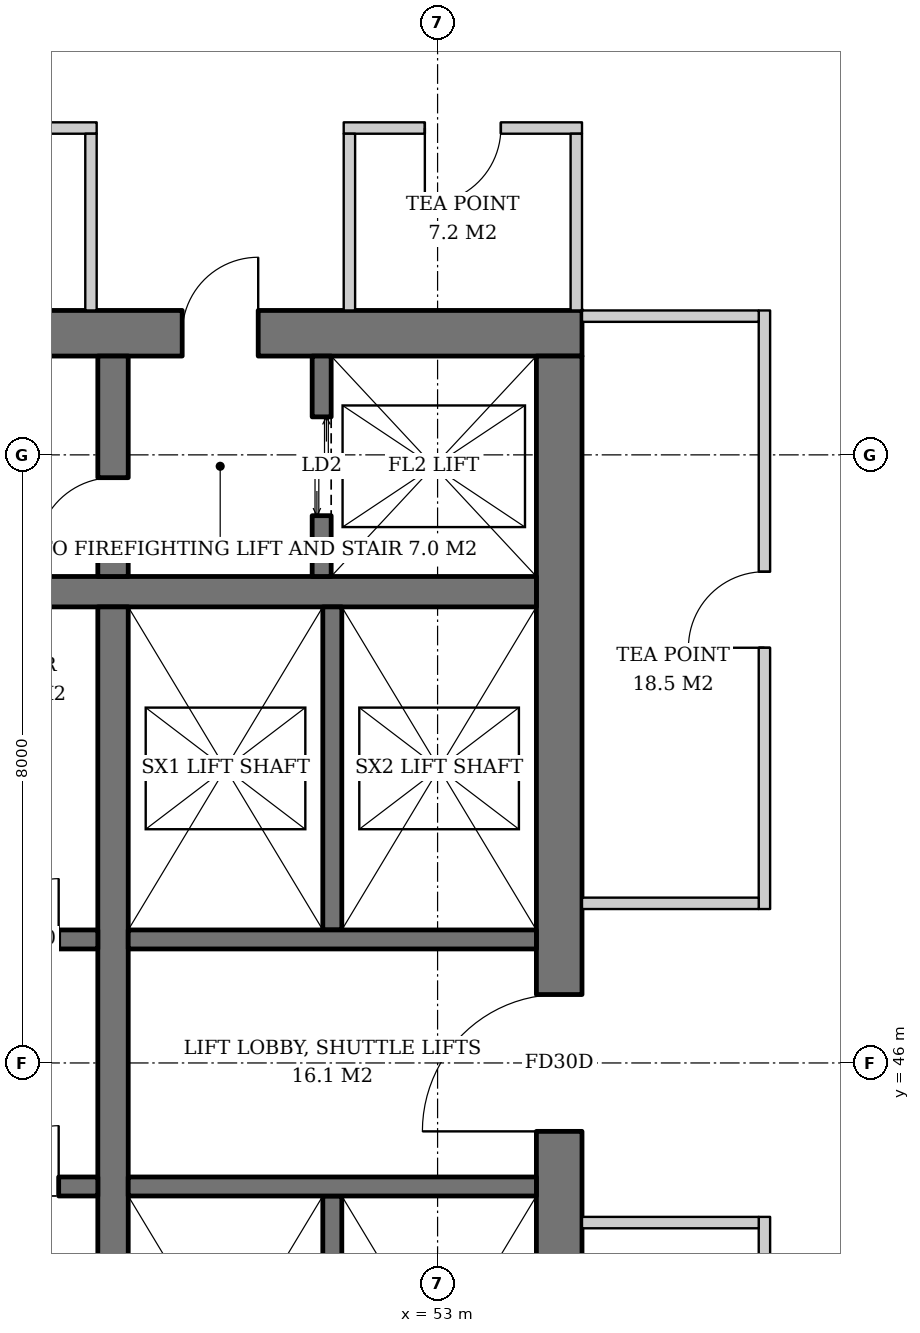
"""IFC4 building model, lengths in metres.
Left out: names, types, materials, properties, quantities, classifications, styles, units other than length and angle.
Written with IfcOpenShell. Run it as: python <this file> out.ifc"""

import sys

from ifc_helpers import new_model, si_unit, direction, frame, frame_2d, origin, origin_2d, place, context, subcontext, project, spatial, rectangle, extrude, element, fill, save


model = new_model("IFC4")
c1 = context("Model", 3, precision=1e-05, world=origin(), true_north=direction((0.0, 1.0)))
c2 = subcontext(c1, "Body", "Model", "MODEL_VIEW")
j1 = project(units=[si_unit("LENGTHUNIT", "METRE"), si_unit("PLANEANGLEUNIT", "RADIAN")], contexts=[c1])
p1 = place(None, origin())
s1 = spatial("IfcSite", under=j1, at=p1, CompositionType="ELEMENT")
p2 = place(p1, origin())
s2 = spatial("IfcBuilding", under=s1, at=p2, CompositionType="ELEMENT")
p3 = place(p2, frame((0.0, 0.0, 188.2)))
s3 = spatial("IfcBuildingStorey", under=s2, at=p3, CompositionType="ELEMENT", Elevation=188.2)
p4 = place(p3, frame((59.557, 60.557, 0.0), z_axis=(-0.031898107953, -0.031898107953, 0.998981992539), x_axis=(0.707106781187, -0.707106781187, 0.0)))
e1 = element("IfcColumn", 1, at=p4, inside=s3, PredefinedType="COLUMN", context=c2, shape_type="SweptSolid", body=[
    extrude(rectangle(XDim=2.0, YDim=2.0, at=origin_2d()), origin(), (0.0, 0.0, 1.0), 3.804),
])
p5 = place(p3, frame((35.1, 55.6, 0.0), z_axis=(0.0, 0.0, 1.0), x_axis=(1.0, 0.0, 0.0)))
e2 = element("IfcWall", 2, at=p5, inside=s3, PredefinedType="SHEAR", context=c2, shape_type="SweptSolid", body=[
    extrude(rectangle(XDim=19.8, YDim=0.6, at=frame_2d((9.9, 0.0))), origin(), (0.0, 0.0, 1.0), 3.8),
])
p6 = place(p5, frame((14.54, 0.0, 0.0)))
e3 = element("IfcOpeningElement", 3, at=p6, cuts=e2, PredefinedType="OPENING", context=c2, shape_type="SweptSolid", body=[
    extrude(rectangle(XDim=1.0, YDim=2.1, at=frame_2d((0.5, 1.05))), frame((0.0, 0.31, 0.0), z_axis=(0.0, -1.0, 0.0), x_axis=(1.0, 0.0, 0.0)), (0.0, 0.0, 1.0), 0.62),
])
p7 = place(p5, frame((1.024, 0.0, 0.0)))
e4 = element("IfcOpeningElement", 4, at=p7, cuts=e2, PredefinedType="OPENING", context=c2, shape_type="SweptSolid", body=[
    extrude(rectangle(XDim=1.0, YDim=2.1, at=frame_2d((0.5, 1.05))), frame((0.0, 0.31, 0.0), z_axis=(0.0, -1.0, 0.0), x_axis=(1.0, 0.0, 0.0)), (0.0, 0.0, 1.0), 0.62),
])
p8 = place(p5, frame((2.524, 0.0, 0.0)))
e5 = element("IfcOpeningElement", 5, at=p8, cuts=e2, PredefinedType="OPENING", context=c2, shape_type="SweptSolid", body=[
    extrude(rectangle(XDim=1.0, YDim=2.1, at=frame_2d((0.5, 1.05))), frame((0.0, 0.31, 0.0), z_axis=(0.0, -1.0, 0.0), x_axis=(1.0, 0.0, 0.0)), (0.0, 0.0, 1.0), 0.62),
])
p9 = place(p5, frame((4.012, 0.0, 0.0)))
e6 = element("IfcOpeningElement", 6, at=p9, cuts=e2, PredefinedType="OPENING", context=c2, shape_type="SweptSolid", body=[
    extrude(rectangle(XDim=1.0, YDim=2.1, at=frame_2d((0.5, 1.05))), frame((0.0, 0.31, 0.0), z_axis=(0.0, -1.0, 0.0), x_axis=(1.0, 0.0, 0.0)), (0.0, 0.0, 1.0), 0.62),
])
p10 = place(p3, frame((54.6, 36.7, 0.0), z_axis=(0.0, 0.0, 1.0), x_axis=(0.0, 1.0, 0.0)))
e7 = element("IfcWall", 7, at=p10, inside=s3, PredefinedType="SHEAR", context=c2, shape_type="SweptSolid", body=[
    extrude(rectangle(XDim=18.6, YDim=0.6, at=frame_2d((9.3, 0.0))), origin(), (0.0, 0.0, 1.0), 3.8),
])
p11 = place(p10, frame((8.4, 0.0, 0.0)))
e8 = element("IfcOpeningElement", 8, at=p11, cuts=e7, PredefinedType="OPENING", context=c2, shape_type="SweptSolid", body=[
    extrude(rectangle(XDim=1.8, YDim=2.4, at=frame_2d((0.9, 1.2))), frame((0.0, 0.31, 0.0), z_axis=(0.0, -1.0, 0.0), x_axis=(1.0, 0.0, 0.0)), (0.0, 0.0, 1.0), 0.62),
])
p12 = place(p3, frame((35.7, 52.2, 0.0), z_axis=(0.0, 0.0, 1.0), x_axis=(1.0, 0.0, 0.0)))
e9 = element("IfcWall", 9, at=p12, inside=s3, PredefinedType="SHEAR", context=c2, shape_type="SweptSolid", body=[
    extrude(rectangle(XDim=18.6, YDim=0.4, at=frame_2d((9.3, 0.0))), origin(), (0.0, 0.0, 1.0), 3.8),
])
p13 = place(p3, frame((48.73, 40.0, 0.0), z_axis=(0.0, 0.0, 1.0), x_axis=(0.0, 1.0, 0.0)))
e10 = element("IfcWall", 10, at=p13, inside=s3, PredefinedType="SHEAR", context=c2, shape_type="SweptSolid", body=[
    extrude(rectangle(XDim=12.0, YDim=0.4, at=frame_2d((6.0, 0.0))), origin(), (0.0, 0.0, 1.0), 3.8),
])
p14 = place(p3, frame((48.73, 52.4, 0.0), z_axis=(0.0, 0.0, 1.0), x_axis=(0.0, 1.0, 0.0)))
e11 = element("IfcWall", 11, at=p14, inside=s3, PredefinedType="SHEAR", context=c2, shape_type="SweptSolid", body=[
    extrude(rectangle(XDim=2.9, YDim=0.4, at=frame_2d((1.45, 0.0))), origin(), (0.0, 0.0, 1.0), 3.8),
])
p15 = place(p14, frame((0.3, 0.0, 0.0)))
e12 = element("IfcOpeningElement", 12, at=p15, cuts=e11, PredefinedType="OPENING", context=c2, shape_type="SweptSolid", body=[
    extrude(rectangle(XDim=1.0, YDim=2.1, at=frame_2d((0.5, 1.05))), frame((0.0, 0.21, 0.0), z_axis=(0.0, -1.0, 0.0), x_axis=(1.0, 0.0, 0.0)), (0.0, 0.0, 1.0), 0.42),
])
p16 = place(p3, frame((51.475, 52.4, 0.0), z_axis=(0.0, 0.0, 1.0), x_axis=(0.0, 1.0, 0.0)))
e13 = element("IfcWall", 13, at=p16, inside=s3, PredefinedType="SHEAR", context=c2, shape_type="SweptSolid", body=[
    extrude(rectangle(XDim=2.9, YDim=0.25, at=frame_2d((1.45, 0.0))), origin(), (0.0, 0.0, 1.0), 3.8),
])
p17 = place(p16, frame((0.8, 0.0, 0.0)))
e14 = element("IfcOpeningElement", 14, at=p17, cuts=e13, PredefinedType="OPENING", context=c2, shape_type="SweptSolid", body=[
    extrude(rectangle(XDim=1.3, YDim=2.2, at=frame_2d((0.65, 1.1))), frame((0.0, 0.135, 0.0), z_axis=(0.0, -1.0, 0.0), x_axis=(1.0, 0.0, 0.0)), (0.0, 0.0, 1.0), 0.27),
])
p18 = place(p3, frame((35.7, 47.625, 0.0), z_axis=(0.0, 0.0, 1.0), x_axis=(1.0, 0.0, 0.0)))
e15 = element("IfcWall", 15, at=p18, inside=s3, PredefinedType="SHEAR", context=c2, shape_type="SweptSolid", body=[
    extrude(rectangle(XDim=12.83, YDim=0.25, at=frame_2d((6.415, 0.0))), origin(), (0.0, 0.0, 1.0), 3.8),
])
p19 = place(p18, frame((0.7, 0.0, 0.0)))
e16 = element("IfcOpeningElement", 16, at=p19, cuts=e15, PredefinedType="OPENING", context=c2, shape_type="SweptSolid", body=[
    extrude(rectangle(XDim=1.1, YDim=2.2, at=frame_2d((0.55, 1.1))), frame((0.0, 0.135, 0.0), z_axis=(0.0, -1.0, 0.0), x_axis=(1.0, 0.0, 0.0)), (0.0, 0.0, 1.0), 0.27),
])
p20 = place(p18, frame((3.45, 0.0, 0.0)))
e17 = element("IfcOpeningElement", 17, at=p20, cuts=e15, PredefinedType="OPENING", context=c2, shape_type="SweptSolid", body=[
    extrude(rectangle(XDim=1.1, YDim=2.2, at=frame_2d((0.55, 1.1))), frame((0.0, 0.135, 0.0), z_axis=(0.0, -1.0, 0.0), x_axis=(1.0, 0.0, 0.0)), (0.0, 0.0, 1.0), 0.27),
])
p21 = place(p18, frame((6.2, 0.0, 0.0)))
e18 = element("IfcOpeningElement", 18, at=p21, cuts=e15, PredefinedType="OPENING", context=c2, shape_type="SweptSolid", body=[
    extrude(rectangle(XDim=1.1, YDim=2.2, at=frame_2d((0.55, 1.1))), frame((0.0, 0.135, 0.0), z_axis=(0.0, -1.0, 0.0), x_axis=(1.0, 0.0, 0.0)), (0.0, 0.0, 1.0), 0.27),
])
p22 = place(p18, frame((9.0, 0.0, 0.0)))
e19 = element("IfcOpeningElement", 19, at=p22, cuts=e15, PredefinedType="OPENING", context=c2, shape_type="SweptSolid", body=[
    extrude(rectangle(XDim=1.0, YDim=2.1, at=frame_2d((0.5, 1.05))), frame((0.0, 0.135, 0.0), z_axis=(0.0, -1.0, 0.0), x_axis=(1.0, 0.0, 0.0)), (0.0, 0.0, 1.0), 0.27),
])
p23 = place(p18, frame((11.515, 0.0, 0.0)))
e20 = element("IfcOpeningElement", 20, at=p23, cuts=e15, PredefinedType="OPENING", context=c2, shape_type="SweptSolid", body=[
    extrude(rectangle(XDim=0.8, YDim=2.0, at=frame_2d((0.4, 1.0))), frame((0.0, 0.135, 0.0), z_axis=(0.0, -1.0, 0.0), x_axis=(1.0, 0.0, 0.0)), (0.0, 0.0, 1.0), 0.27),
])
p24 = place(p3, frame((35.7, 44.375, 0.0), z_axis=(0.0, 0.0, 1.0), x_axis=(1.0, 0.0, 0.0)))
e21 = element("IfcWall", 21, at=p24, inside=s3, PredefinedType="SHEAR", context=c2, shape_type="SweptSolid", body=[
    extrude(rectangle(XDim=12.83, YDim=0.25, at=frame_2d((6.415, 0.0))), origin(), (0.0, 0.0, 1.0), 3.8),
])
p25 = place(p24, frame((0.7, 0.0, 0.0)))
e22 = element("IfcOpeningElement", 22, at=p25, cuts=e21, PredefinedType="OPENING", context=c2, shape_type="SweptSolid", body=[
    extrude(rectangle(XDim=1.1, YDim=2.2, at=frame_2d((0.55, 1.1))), frame((0.0, 0.135, 0.0), z_axis=(0.0, -1.0, 0.0), x_axis=(1.0, 0.0, 0.0)), (0.0, 0.0, 1.0), 0.27),
])
p26 = place(p24, frame((3.45, 0.0, 0.0)))
e23 = element("IfcOpeningElement", 23, at=p26, cuts=e21, PredefinedType="OPENING", context=c2, shape_type="SweptSolid", body=[
    extrude(rectangle(XDim=1.1, YDim=2.2, at=frame_2d((0.55, 1.1))), frame((0.0, 0.135, 0.0), z_axis=(0.0, -1.0, 0.0), x_axis=(1.0, 0.0, 0.0)), (0.0, 0.0, 1.0), 0.27),
])
p27 = place(p24, frame((6.2, 0.0, 0.0)))
e24 = element("IfcOpeningElement", 24, at=p27, cuts=e21, PredefinedType="OPENING", context=c2, shape_type="SweptSolid", body=[
    extrude(rectangle(XDim=1.1, YDim=2.2, at=frame_2d((0.55, 1.1))), frame((0.0, 0.135, 0.0), z_axis=(0.0, -1.0, 0.0), x_axis=(1.0, 0.0, 0.0)), (0.0, 0.0, 1.0), 0.27),
])
p28 = place(p24, frame((9.0, 0.0, 0.0)))
e25 = element("IfcOpeningElement", 25, at=p28, cuts=e21, PredefinedType="OPENING", context=c2, shape_type="SweptSolid", body=[
    extrude(rectangle(XDim=1.0, YDim=2.1, at=frame_2d((0.5, 1.05))), frame((0.0, 0.135, 0.0), z_axis=(0.0, -1.0, 0.0), x_axis=(1.0, 0.0, 0.0)), (0.0, 0.0, 1.0), 0.27),
])
p29 = place(p24, frame((11.515, 0.0, 0.0)))
e26 = element("IfcOpeningElement", 26, at=p29, cuts=e21, PredefinedType="OPENING", context=c2, shape_type="SweptSolid", body=[
    extrude(rectangle(XDim=0.8, YDim=2.0, at=frame_2d((0.4, 1.0))), frame((0.0, 0.135, 0.0), z_axis=(0.0, -1.0, 0.0), x_axis=(1.0, 0.0, 0.0)), (0.0, 0.0, 1.0), 0.27),
])
p30 = place(p3, frame((51.615, 47.75, 0.0), z_axis=(0.0, 0.0, 1.0), x_axis=(0.0, 1.0, 0.0)))
e27 = element("IfcWall", 27, at=p30, inside=s3, PredefinedType="SHEAR", context=c2, shape_type="SweptSolid", body=[
    extrude(rectangle(XDim=4.25, YDim=0.25, at=frame_2d((2.125, 0.0))), origin(), (0.0, 0.0, 1.0), 3.8),
])
p31 = place(p3, frame((48.93, 47.625, 0.0), z_axis=(0.0, 0.0, 1.0), x_axis=(1.0, 0.0, 0.0)))
e28 = element("IfcWall", 28, at=p31, inside=s3, PredefinedType="SHEAR", context=c2, shape_type="SweptSolid", body=[
    extrude(rectangle(XDim=5.37, YDim=0.25, at=frame_2d((2.685, 0.0))), origin(), (0.0, 0.0, 1.0), 3.8),
])
p32 = place(p3, frame((51.615, 44.25, 0.0), z_axis=(0.0, 0.0, 1.0), x_axis=(0.0, -1.0, 0.0)))
e29 = element("IfcWall", 29, at=p32, inside=s3, PredefinedType="SHEAR", context=c2, shape_type="SweptSolid", body=[
    extrude(rectangle(XDim=4.25, YDim=0.25, at=frame_2d((2.125, 0.0))), origin(), (0.0, 0.0, 1.0), 3.8),
])
p33 = place(p3, frame((48.93, 44.375, 0.0), z_axis=(0.0, 0.0, 1.0), x_axis=(1.0, 0.0, 0.0)))
e30 = element("IfcWall", 30, at=p33, inside=s3, PredefinedType="SHEAR", context=c2, shape_type="SweptSolid", body=[
    extrude(rectangle(XDim=5.37, YDim=0.25, at=frame_2d((2.685, 0.0))), origin(), (0.0, 0.0, 1.0), 3.8),
])
p34 = place(p3, frame((57.3, 36.1, 0.0), z_axis=(0.0, 0.0, 1.0), x_axis=(0.0, 1.0, 0.0)))
e31 = element("IfcWall", 31, at=p34, inside=s3, PredefinedType="PARTITIONING", context=c2, shape_type="SweptSolid", body=[
    extrude(rectangle(XDim=7.875, YDim=0.15, at=frame_2d((3.938, 0.0))), origin(), (0.0, 0.0, 1.0), 2.867),
])
p35 = place(p34, frame((3.438, 0.0, 0.0)))
e32 = element("IfcOpeningElement", 32, at=p35, cuts=e31, PredefinedType="OPENING", context=c2, shape_type="SweptSolid", body=[
    extrude(rectangle(XDim=1.0, YDim=2.1, at=frame_2d((0.5, 1.05))), frame((0.0, 0.085, 0.0), z_axis=(0.0, -1.0, 0.0), x_axis=(1.0, 0.0, 0.0)), (0.0, 0.0, 1.0), 0.17),
])
p36 = place(p3, frame((54.9, 43.9, 0.0), z_axis=(0.0, 0.0, 1.0), x_axis=(1.0, 0.0, 0.0)))
e33 = element("IfcWall", 33, at=p36, inside=s3, PredefinedType="PARTITIONING", context=c2, shape_type="SweptSolid", body=[
    extrude(rectangle(XDim=2.325, YDim=0.15, at=frame_2d((1.163, 0.0))), origin(), (0.0, 0.0, 1.0), 3.62),
])
p37 = place(p3, frame((57.3, 48.025, 0.0), z_axis=(0.0, 0.0, 1.0), x_axis=(0.0, 1.0, 0.0)))
e34 = element("IfcWall", 34, at=p37, inside=s3, PredefinedType="PARTITIONING", context=c2, shape_type="SweptSolid", body=[
    extrude(rectangle(XDim=7.875, YDim=0.15, at=frame_2d((3.938, 0.0))), origin(), (0.0, 0.0, 1.0), 2.867),
])
p38 = place(p37, frame((3.438, 0.0, 0.0)))
e35 = element("IfcOpeningElement", 35, at=p38, cuts=e34, PredefinedType="OPENING", context=c2, shape_type="SweptSolid", body=[
    extrude(rectangle(XDim=1.0, YDim=2.1, at=frame_2d((0.5, 1.05))), frame((0.0, 0.085, 0.0), z_axis=(0.0, -1.0, 0.0), x_axis=(1.0, 0.0, 0.0)), (0.0, 0.0, 1.0), 0.17),
])
for number, where, z_axis, x_axis in (
    (36, (54.9, 48.1, 0.0), (0.0, 0.0, 1.0), (1.0, 0.0, 0.0)),
    (37, (54.9, 55.825, 0.0), (0.0, 0.0, 1.0), (1.0, 0.0, 0.0)),
):
    element("IfcWall", number, at=place(p3, frame(where, z_axis=z_axis, x_axis=x_axis)), inside=s3, PredefinedType="PARTITIONING", context=c2, shape_type="SweptSolid", body=[
        extrude(rectangle(XDim=2.325, YDim=0.15, at=frame_2d((1.163, 0.0))), origin(), (0.0, 0.0, 1.0), 3.62),
    ])
p39 = place(p3, frame((54.9, 58.3, 0.0), z_axis=(0.0, 0.0, 1.0), x_axis=(-1.0, 0.0, 0.0)))
e38 = element("IfcWall", 38, at=p39, inside=s3, PredefinedType="PARTITIONING", context=c2, shape_type="SweptSolid", body=[
    extrude(rectangle(XDim=3.135, YDim=0.15, at=frame_2d((1.567, 0.0))), origin(), (0.0, 0.0, 1.0), 2.92),
])
p40 = place(p39, frame((1.067, 0.0, 0.0)))
e39 = element("IfcOpeningElement", 39, at=p40, cuts=e38, PredefinedType="OPENING", context=c2, shape_type="SweptSolid", body=[
    extrude(rectangle(XDim=1.0, YDim=2.1, at=frame_2d((0.5, 1.05))), frame((0.0, 0.085, 0.0), z_axis=(0.0, -1.0, 0.0), x_axis=(1.0, 0.0, 0.0)), (0.0, 0.0, 1.0), 0.17),
])
p41 = place(p3, frame((54.825, 55.9, 0.0), z_axis=(0.0, 0.0, 1.0), x_axis=(0.0, 1.0, 0.0)))
e40 = element("IfcWall", 40, at=p41, inside=s3, PredefinedType="PARTITIONING", context=c2, shape_type="SweptSolid", body=[
    extrude(rectangle(XDim=2.325, YDim=0.15, at=frame_2d((1.163, 0.0))), origin(), (0.0, 0.0, 1.0), 2.867),
])
p42 = place(p3, frame((51.84, 55.9, 0.0), z_axis=(0.0, 0.0, 1.0), x_axis=(0.0, 1.0, 0.0)))
e41 = element("IfcWall", 41, at=p42, inside=s3, PredefinedType="PARTITIONING", context=c2, shape_type="SweptSolid", body=[
    extrude(rectangle(XDim=2.325, YDim=0.15, at=frame_2d((1.163, 0.0))), origin(), (0.0, 0.0, 1.0), 3.62),
])
p43 = place(p3, frame((48.515, 58.3, 0.0), z_axis=(0.0, 0.0, 1.0), x_axis=(-1.0, 0.0, 0.0)))
e42 = element("IfcWall", 42, at=p43, inside=s3, PredefinedType="PARTITIONING", context=c2, shape_type="SweptSolid", body=[
    extrude(rectangle(XDim=7.278, YDim=0.15, at=frame_2d((3.639, 0.0))), origin(), (0.0, 0.0, 1.0), 2.867),
])
p44 = place(p43, frame((3.139, 0.0, 0.0)))
e43 = element("IfcOpeningElement", 43, at=p44, cuts=e42, PredefinedType="OPENING", context=c2, shape_type="SweptSolid", body=[
    extrude(rectangle(XDim=1.0, YDim=2.1, at=frame_2d((0.5, 1.05))), frame((0.0, 0.085, 0.0), z_axis=(0.0, -1.0, 0.0), x_axis=(1.0, 0.0, 0.0)), (0.0, 0.0, 1.0), 0.17),
])
p45 = place(p3, frame((48.44, 55.9, 0.0), z_axis=(0.0, 0.0, 1.0), x_axis=(0.0, 1.0, 0.0)))
e44 = element("IfcWall", 44, at=p45, inside=s3, PredefinedType="PARTITIONING", context=c2, shape_type="SweptSolid", body=[
    extrude(rectangle(XDim=2.325, YDim=0.15, at=frame_2d((1.163, 0.0))), origin(), (0.0, 0.0, 1.0), 3.62),
])
p46 = place(p17, origin())
e45 = element("IfcDoor", 45, at=p46, inside=s3, OperationType="DOUBLE_DOOR_SLIDING", PredefinedType="DOOR", context=c2, shape_type="SweptSolid", body=[
    extrude(rectangle(XDim=1.3, YDim=2.2, at=frame_2d((0.65, 1.1))), frame((0.0, 0.025, 0.0), z_axis=(0.0, -1.0, 0.0), x_axis=(1.0, 0.0, 0.0)), (0.0, 0.0, 1.0), 0.05),
])
fill(e14, e45)
p47 = place(p23, origin())
e46 = element("IfcDoor", 46, at=p47, inside=s3, OperationType="SINGLE_SWING_RIGHT", PredefinedType="DOOR", context=c2, shape_type="SweptSolid", body=[
    extrude(rectangle(XDim=0.8, YDim=2.0, at=frame_2d((0.4, 1.0))), frame((0.0, 0.025, 0.0), z_axis=(0.0, -1.0, 0.0), x_axis=(1.0, 0.0, 0.0)), (0.0, 0.0, 1.0), 0.05),
])
fill(e20, e46)
p48 = place(p29, origin())
e47 = element("IfcDoor", 47, at=p48, inside=s3, OperationType="SINGLE_SWING_RIGHT", PredefinedType="DOOR", context=c2, shape_type="SweptSolid", body=[
    extrude(rectangle(XDim=0.8, YDim=2.0, at=frame_2d((0.4, 1.0))), frame((0.0, 0.025, 0.0), z_axis=(0.0, -1.0, 0.0), x_axis=(1.0, 0.0, 0.0)), (0.0, 0.0, 1.0), 0.05),
])
fill(e26, e47)
p49 = place(p15, origin())
e48 = element("IfcDoor", 48, at=p49, inside=s3, OperationType="SINGLE_SWING_LEFT", PredefinedType="DOOR", context=c2, shape_type="SweptSolid", body=[
    extrude(rectangle(XDim=1.0, YDim=2.1, at=frame_2d((0.5, 1.05))), frame((0.0, 0.025, 0.0), z_axis=(0.0, -1.0, 0.0), x_axis=(1.0, 0.0, 0.0)), (0.0, 0.0, 1.0), 0.05),
])
fill(e12, e48)
p50 = place(p6, origin())
e49 = element("IfcDoor", 49, at=p50, inside=s3, OperationType="SINGLE_SWING_RIGHT", PredefinedType="DOOR", context=c2, shape_type="SweptSolid", body=[
    extrude(rectangle(XDim=1.0, YDim=2.1, at=frame_2d((0.5, 1.05))), frame((0.0, 0.025, 0.0), z_axis=(0.0, -1.0, 0.0), x_axis=(1.0, 0.0, 0.0)), (0.0, 0.0, 1.0), 0.05),
])
fill(e3, e49)
p51 = place(p11, origin())
e50 = element("IfcDoor", 50, at=p51, inside=s3, OperationType="DOUBLE_DOOR_SINGLE_SWING", PredefinedType="DOOR", context=c2, shape_type="SweptSolid", body=[
    extrude(rectangle(XDim=1.8, YDim=2.4, at=frame_2d((0.9, 1.2))), frame((0.0, 0.025, 0.0), z_axis=(0.0, -1.0, 0.0), x_axis=(1.0, 0.0, 0.0)), (0.0, 0.0, 1.0), 0.05),
])
fill(e8, e50)
p52 = place(p38, origin())
e51 = element("IfcDoor", 51, at=p52, inside=s3, OperationType="SINGLE_SWING_LEFT", PredefinedType="DOOR", context=c2, shape_type="SweptSolid", body=[
    extrude(rectangle(XDim=1.0, YDim=2.1, at=frame_2d((0.5, 1.05))), frame((0.0, 0.025, 0.0), z_axis=(0.0, -1.0, 0.0), x_axis=(1.0, 0.0, 0.0)), (0.0, 0.0, 1.0), 0.05),
])
fill(e35, e51)
p53 = place(p40, origin())
e52 = element("IfcDoor", 52, at=p53, inside=s3, OperationType="SINGLE_SWING_RIGHT", PredefinedType="DOOR", context=c2, shape_type="SweptSolid", body=[
    extrude(rectangle(XDim=1.0, YDim=2.1, at=frame_2d((0.5, 1.05))), frame((0.0, 0.025, 0.0), z_axis=(0.0, -1.0, 0.0), x_axis=(1.0, 0.0, 0.0)), (0.0, 0.0, 1.0), 0.05),
])
fill(e39, e52)
save(model, sys.argv[1])
